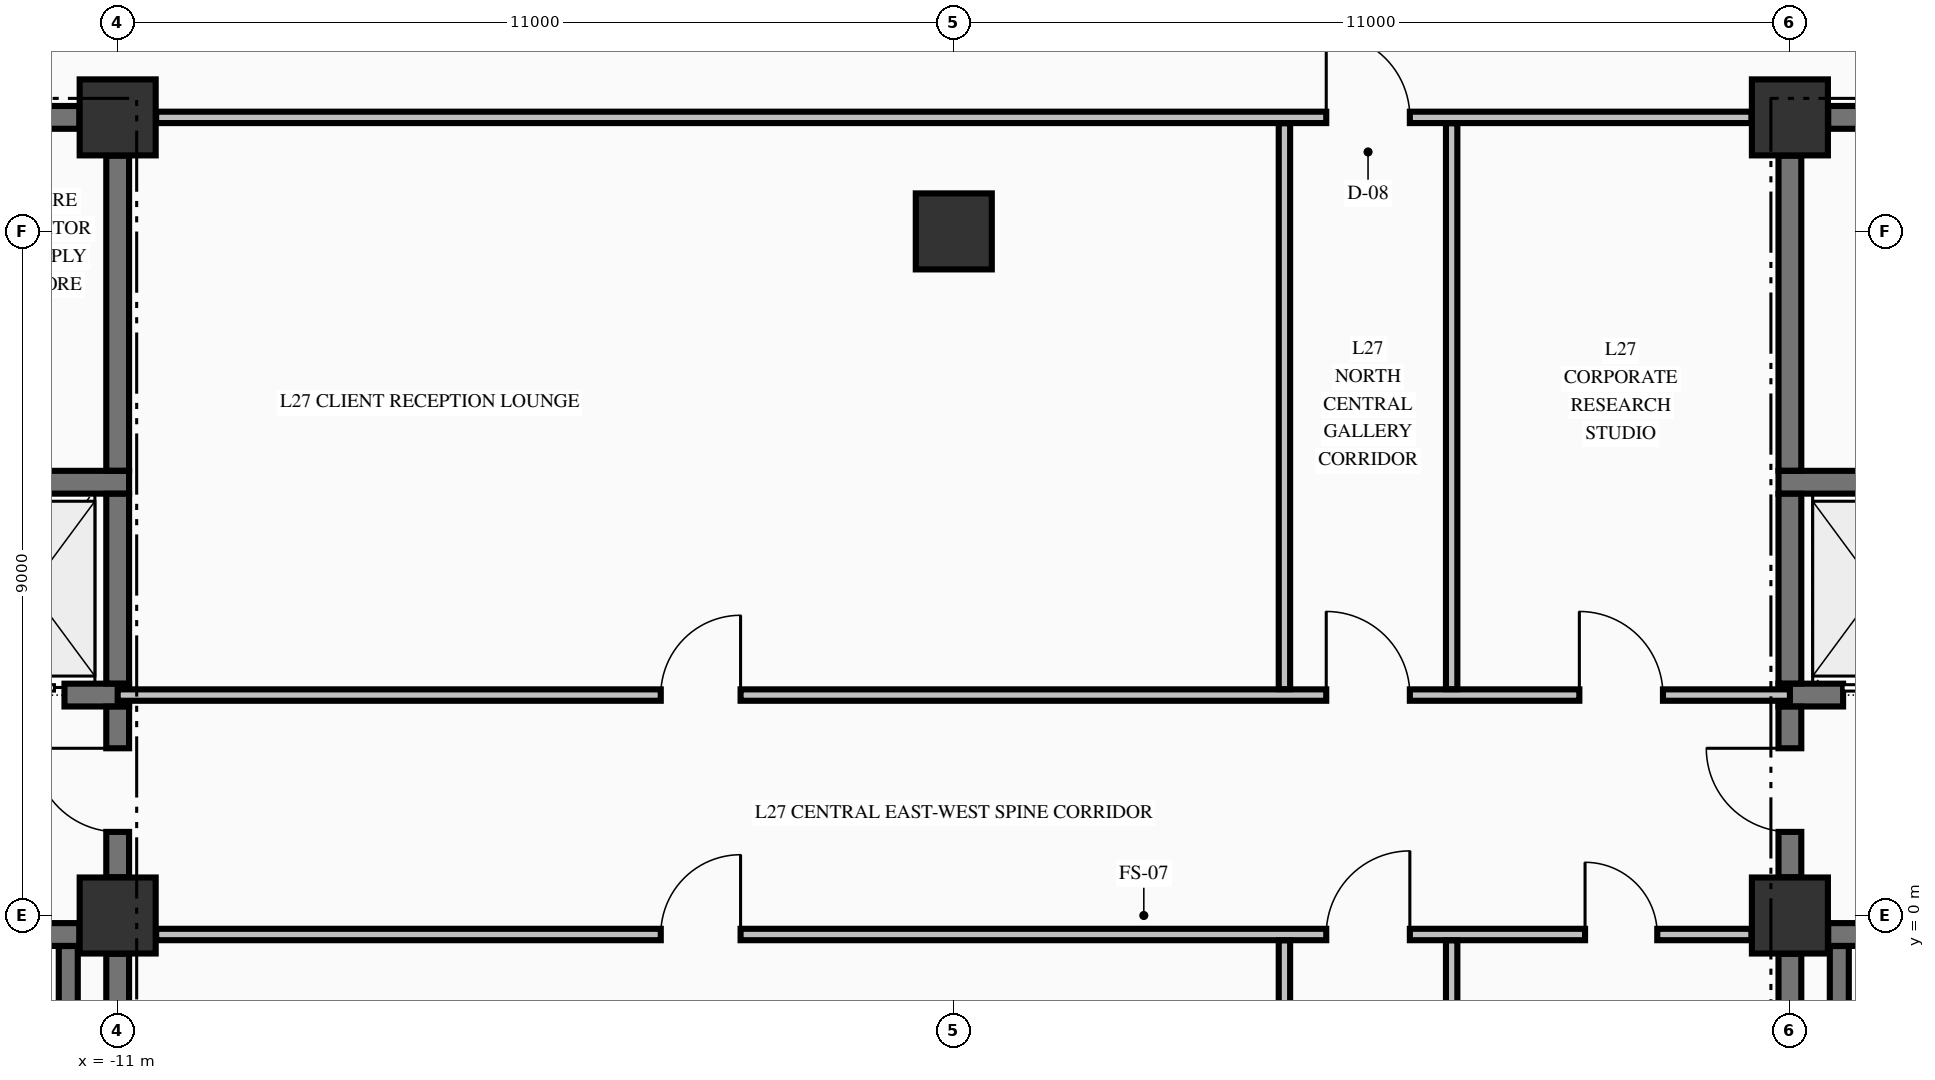
"""IFC4 building model, lengths in metres.
Left out: names, types, materials, properties, quantities, classifications, styles, units other than length and angle.
Written with IfcOpenShell. Run it as: python <this file> out.ifc"""

import sys

from ifc_helpers import new_model, si_unit, direction, frame, frame_2d, origin, origin_2d, place, context, subcontext, project, spatial, rectangle, extrude, element, fill, save


model = new_model("IFC4")
c1 = context("Model", 3, precision=1e-05, world=origin(), true_north=direction((0.0, 1.0)))
c2 = subcontext(c1, "Body", "Model", "MODEL_VIEW")
j1 = project(units=[si_unit("LENGTHUNIT", "METRE"), si_unit("PLANEANGLEUNIT", "RADIAN")], contexts=[c1])
p1 = place(None, origin())
s1 = spatial("IfcSite", under=j1, at=p1, CompositionType="ELEMENT")
p2 = place(p1, origin())
s2 = spatial("IfcBuilding", under=s1, at=p2, CompositionType="ELEMENT")
p3 = place(p2, frame((0.0, 0.0, 109.21)))
s3 = spatial("IfcBuildingStorey", under=s2, at=p3, CompositionType="ELEMENT", Elevation=109.21)
for number, where, z_axis, x_axis in (
    (1, (-11.0, 0.0, -0.25), (0.0, 0.0, 1.0), (1.0, 0.0, 0.0)),
    (2, (-11.0, 10.5, -0.25), (0.0, 0.0, 1.0), (1.0, 0.0, 0.0)),
    (3, (11.0, 0.0, -0.25), (0.0, 0.0, 1.0), (1.0, 0.0, 0.0)),
    (4, (11.0, 10.5, -0.25), (0.0, 0.0, 1.0), (1.0, 0.0, 0.0)),
    (5, (0.0, 9.0, -0.25), (0.0, 0.0, 1.0), (1.0, 0.0, 0.0)),
):
    element("IfcColumn", number, at=place(p3, frame(where, z_axis=z_axis, x_axis=x_axis)), inside=s3, PredefinedType="COLUMN", context=c2, shape_type="SweptSolid", body=[
        extrude(rectangle(XDim=1.0, YDim=1.0, at=origin_2d()), origin(), (0.0, 0.0, 1.0), 3.57),
    ])
p4 = place(p3, frame((-19.496, -0.25, 0.0), z_axis=(0.0, 0.0, 1.0), x_axis=(1.0, 0.0, 0.0)))
e6 = element("IfcWall", 6, at=p4, inside=s3, PredefinedType="SHEAR", context=c2, shape_type="SweptSolid", body=[
    extrude(rectangle(XDim=7.992, YDim=0.3, at=frame_2d((3.996, 0.0))), origin(), (0.0, 0.0, 1.0), 3.32),
])
p5 = place(p4, frame((5.796, 0.0, 0.0)))
e7 = element("IfcOpeningElement", 7, at=p5, cuts=e6, PredefinedType="OPENING", context=c2, shape_type="SweptSolid", body=[
    extrude(rectangle(XDim=1.1, YDim=2.15, at=frame_2d((0.55, 1.075))), frame((0.0, 0.16, 0.0), z_axis=(0.0, -1.0, 0.0), x_axis=(1.0, 0.0, 0.0)), (0.0, 0.0, 1.0), 0.32),
])
p6 = place(p3, frame((11.504, -0.25, 0.0), z_axis=(0.0, 0.0, 1.0), x_axis=(1.0, 0.0, 0.0)))
e8 = element("IfcWall", 8, at=p6, inside=s3, PredefinedType="SHEAR", context=c2, shape_type="SweptSolid", body=[
    extrude(rectangle(XDim=3.371, YDim=0.3, at=frame_2d((1.686, 0.0))), origin(), (0.0, 0.0, 1.0), 3.32),
])
p7 = place(p6, frame((1.096, 0.0, 0.0)))
e9 = element("IfcOpeningElement", 9, at=p7, cuts=e8, PredefinedType="OPENING", context=c2, shape_type="SweptSolid", body=[
    extrude(rectangle(XDim=1.1, YDim=2.15, at=frame_2d((0.55, 1.075))), frame((0.0, 0.16, 0.0), z_axis=(0.0, -1.0, 0.0), x_axis=(1.0, 0.0, 0.0)), (0.0, 0.0, 1.0), 0.32),
])
p8 = place(p3, frame((-14.875, 2.9, 0.0), z_axis=(0.0, 0.0, 1.0), x_axis=(1.0, 0.0, 0.0)))
e10 = element("IfcWall", 10, at=p8, inside=s3, PredefinedType="SHEAR", context=c2, shape_type="SweptSolid", body=[
    extrude(rectangle(XDim=4.025, YDim=0.3, at=frame_2d((2.012, 0.0))), origin(), (0.0, 0.0, 1.0), 3.32),
])
p9 = place(p8, frame((2.075, 0.0, 0.0)))
e11 = element("IfcOpeningElement", 11, at=p9, cuts=e10, PredefinedType="OPENING", context=c2, shape_type="SweptSolid", body=[
    extrude(rectangle(XDim=1.1, YDim=2.2, at=frame_2d((0.55, 1.1))), frame((0.0, 0.16, 0.0), z_axis=(0.0, -1.0, 0.0), x_axis=(1.0, 0.0, 0.0)), (0.0, 0.0, 1.0), 0.32),
])
p10 = place(p3, frame((10.85, 2.9, 0.0), z_axis=(0.0, 0.0, 1.0), x_axis=(1.0, 0.0, 0.0)))
e12 = element("IfcWall", 12, at=p10, inside=s3, PredefinedType="SHEAR", context=c2, shape_type="SweptSolid", body=[
    extrude(rectangle(XDim=4.025, YDim=0.3, at=frame_2d((2.012, 0.0))), origin(), (0.0, 0.0, 1.0), 3.32),
])
p11 = place(p10, frame((0.85, 0.0, 0.0)))
e13 = element("IfcOpeningElement", 13, at=p11, cuts=e12, PredefinedType="OPENING", context=c2, shape_type="SweptSolid", body=[
    extrude(rectangle(XDim=1.1, YDim=2.2, at=frame_2d((0.55, 1.1))), frame((0.0, 0.16, 0.0), z_axis=(0.0, -1.0, 0.0), x_axis=(1.0, 0.0, 0.0)), (0.0, 0.0, 1.0), 0.32),
])
for number, where, z_axis, x_axis in (
    (14, (-14.875, 5.7, 0.0), (0.0, 0.0, 1.0), (1.0, 0.0, 0.0)),
    (15, (10.85, 5.7, 0.0), (0.0, 0.0, 1.0), (1.0, 0.0, 0.0)),
):
    element("IfcWall", number, at=place(p3, frame(where, z_axis=z_axis, x_axis=x_axis)), inside=s3, PredefinedType="SHEAR", context=c2, shape_type="SweptSolid", body=[
        extrude(rectangle(XDim=4.025, YDim=0.3, at=frame_2d((2.012, 0.0))), origin(), (0.0, 0.0, 1.0), 3.32),
    ])
p12 = place(p3, frame((-14.7, 10.5, 0.0), z_axis=(0.0, 0.0, 1.0), x_axis=(1.0, 0.0, 0.0)))
e16 = element("IfcWall", 16, at=p12, inside=s3, PredefinedType="SHEAR", context=c2, shape_type="SweptSolid", body=[
    extrude(rectangle(XDim=3.196, YDim=0.3, at=frame_2d((1.598, 0.0))), origin(), (0.0, 0.0, 1.0), 3.32),
])
p13 = place(p12, frame((0.245, 0.0, 0.0)))
e17 = element("IfcOpeningElement", 17, at=p13, cuts=e16, PredefinedType="OPENING", context=c2, shape_type="SweptSolid", body=[
    extrude(rectangle(XDim=0.95, YDim=2.15, at=frame_2d((0.475, 1.075))), frame((0.0, 0.16, 0.0), z_axis=(0.0, -1.0, 0.0), x_axis=(1.0, 0.0, 0.0)), (0.0, 0.0, 1.0), 0.32),
])
p14 = place(p3, frame((11.504, 10.5, 0.0), z_axis=(0.0, 0.0, 1.0), x_axis=(1.0, 0.0, 0.0)))
e18 = element("IfcWall", 18, at=p14, inside=s3, PredefinedType="SHEAR", context=c2, shape_type="SweptSolid", body=[
    extrude(rectangle(XDim=3.196, YDim=0.3, at=frame_2d((1.598, 0.0))), origin(), (0.0, 0.0, 1.0), 3.32),
])
p15 = place(p14, frame((1.471, 0.0, 0.0)))
e19 = element("IfcOpeningElement", 19, at=p15, cuts=e18, PredefinedType="OPENING", context=c2, shape_type="SweptSolid", body=[
    extrude(rectangle(XDim=0.95, YDim=2.15, at=frame_2d((0.475, 1.075))), frame((0.0, 0.16, 0.0), z_axis=(0.0, -1.0, 0.0), x_axis=(1.0, 0.0, 0.0)), (0.0, 0.0, 1.0), 0.32),
])
p16 = place(p3, frame((-10.494, -0.25, 0.0), z_axis=(0.0, 0.0, 1.0), x_axis=(1.0, 0.0, 0.0)))
e20 = element("IfcWall", 20, at=p16, inside=s3, PredefinedType="PARTITIONING", context=c2, shape_type="SweptSolid", body=[
    extrude(rectangle(XDim=20.988, YDim=0.15, at=frame_2d((10.494, 0.0))), origin(), (0.0, 0.0, 1.0), 3.32),
])
p17 = place(p16, frame((15.394, 0.0, 0.0)))
e21 = element("IfcOpeningElement", 21, at=p17, cuts=e20, PredefinedType="OPENING", context=c2, shape_type="SweptSolid", body=[
    extrude(rectangle(XDim=1.1, YDim=2.15, at=frame_2d((0.55, 1.075))), frame((0.0, 0.085, 0.0), z_axis=(0.0, -1.0, 0.0), x_axis=(1.0, 0.0, 0.0)), (0.0, 0.0, 1.0), 0.17),
])
p18 = place(p16, frame((6.639, 0.0, 0.0)))
e22 = element("IfcOpeningElement", 22, at=p18, cuts=e20, PredefinedType="OPENING", context=c2, shape_type="SweptSolid", body=[
    extrude(rectangle(XDim=1.05, YDim=2.15, at=frame_2d((0.525, 1.075))), frame((0.0, 0.085, 0.0), z_axis=(0.0, -1.0, 0.0), x_axis=(1.0, 0.0, 0.0)), (0.0, 0.0, 1.0), 0.17),
])
p19 = place(p16, frame((18.799, 0.0, 0.0)))
e23 = element("IfcOpeningElement", 23, at=p19, cuts=e20, PredefinedType="OPENING", context=c2, shape_type="SweptSolid", body=[
    extrude(rectangle(XDim=0.95, YDim=2.15, at=frame_2d((0.475, 1.075))), frame((0.0, 0.085, 0.0), z_axis=(0.0, -1.0, 0.0), x_axis=(1.0, 0.0, 0.0)), (0.0, 0.0, 1.0), 0.17),
])
p20 = place(p3, frame((-11.0, 2.9, 0.0), z_axis=(0.0, 0.0, 1.0), x_axis=(1.0, 0.0, 0.0)))
e24 = element("IfcWall", 24, at=p20, inside=s3, PredefinedType="PARTITIONING", context=c2, shape_type="SweptSolid", body=[
    extrude(rectangle(XDim=22.0, YDim=0.15, at=frame_2d((11.0, 0.0))), origin(), (0.0, 0.0, 1.0), 3.32),
])
p21 = place(p20, frame((15.9, 0.0, 0.0)))
e25 = element("IfcOpeningElement", 25, at=p21, cuts=e24, PredefinedType="OPENING", context=c2, shape_type="SweptSolid", body=[
    extrude(rectangle(XDim=1.1, YDim=2.15, at=frame_2d((0.55, 1.075))), frame((0.0, 0.085, 0.0), z_axis=(0.0, -1.0, 0.0), x_axis=(1.0, 0.0, 0.0)), (0.0, 0.0, 1.0), 0.17),
])
p22 = place(p20, frame((7.145, 0.0, 0.0)))
e26 = element("IfcOpeningElement", 26, at=p22, cuts=e24, PredefinedType="OPENING", context=c2, shape_type="SweptSolid", body=[
    extrude(rectangle(XDim=1.05, YDim=2.15, at=frame_2d((0.525, 1.075))), frame((0.0, 0.085, 0.0), z_axis=(0.0, -1.0, 0.0), x_axis=(1.0, 0.0, 0.0)), (0.0, 0.0, 1.0), 0.17),
])
p23 = place(p20, frame((19.23, 0.0, 0.0)))
e27 = element("IfcOpeningElement", 27, at=p23, cuts=e24, PredefinedType="OPENING", context=c2, shape_type="SweptSolid", body=[
    extrude(rectangle(XDim=1.1, YDim=2.15, at=frame_2d((0.55, 1.075))), frame((0.0, 0.085, 0.0), z_axis=(0.0, -1.0, 0.0), x_axis=(1.0, 0.0, 0.0)), (0.0, 0.0, 1.0), 0.17),
])
p24 = place(p3, frame((-10.494, 10.5, 0.0), z_axis=(0.0, 0.0, 1.0), x_axis=(1.0, 0.0, 0.0)))
e28 = element("IfcWall", 28, at=p24, inside=s3, PredefinedType="PARTITIONING", context=c2, shape_type="SweptSolid", body=[
    extrude(rectangle(XDim=20.988, YDim=0.15, at=frame_2d((10.494, 0.0))), origin(), (0.0, 0.0, 1.0), 3.32),
])
p25 = place(p24, frame((15.394, 0.0, 0.0)))
e29 = element("IfcOpeningElement", 29, at=p25, cuts=e28, PredefinedType="OPENING", context=c2, shape_type="SweptSolid", body=[
    extrude(rectangle(XDim=1.1, YDim=2.15, at=frame_2d((0.55, 1.075))), frame((0.0, 0.085, 0.0), z_axis=(0.0, -1.0, 0.0), x_axis=(1.0, 0.0, 0.0)), (0.0, 0.0, 1.0), 0.17),
])
p26 = place(p3, frame((-11.65, -9.798, 0.0), z_axis=(0.0, 0.0, 1.0), x_axis=(0.0, 1.0, 0.0)))
e30 = element("IfcWall", 30, at=p26, inside=s3, PredefinedType="SOLIDWALL", context=c2, shape_type="SweptSolid", body=[
    extrude(rectangle(XDim=9.396, YDim=0.25, at=frame_2d((4.698, 0.0))), origin(), (0.0, 0.0, 1.0), 3.32),
])
p27 = place(p3, frame((-11.0, -9.446, 0.0), z_axis=(0.0, 0.0, 1.0), x_axis=(0.0, 1.0, 0.0)))
e31 = element("IfcWall", 31, at=p27, inside=s3, PredefinedType="SHEAR", context=c2, shape_type="SweptSolid", body=[
    extrude(rectangle(XDim=8.942, YDim=0.3, at=frame_2d((4.471, 0.0))), origin(), (0.0, 0.0, 1.0), 3.32),
])
p28 = place(p3, frame((-11.0, 0.504, 0.0), z_axis=(0.0, 0.0, 1.0), x_axis=(0.0, 1.0, 0.0)))
e32 = element("IfcWall", 32, at=p28, inside=s3, PredefinedType="SHEAR", context=c2, shape_type="SweptSolid", body=[
    extrude(rectangle(XDim=2.244, YDim=0.3, at=frame_2d((1.122, 0.0))), origin(), (0.0, 0.0, 1.0), 3.32),
])
p29 = place(p28, frame((0.596, 0.0, 0.0)))
e33 = element("IfcOpeningElement", 33, at=p29, cuts=e32, PredefinedType="OPENING", context=c2, shape_type="SweptSolid", body=[
    extrude(rectangle(XDim=1.1, YDim=2.15, at=frame_2d((0.55, 1.075))), frame((0.0, 0.16, 0.0), z_axis=(0.0, -1.0, 0.0), x_axis=(1.0, 0.0, 0.0)), (0.0, 0.0, 1.0), 0.32),
])
p30 = place(p3, frame((-11.0, 3.052, 0.0), z_axis=(0.0, 0.0, 1.0), x_axis=(0.0, 1.0, 0.0)))
e34 = element("IfcWall", 34, at=p30, inside=s3, PredefinedType="SHEAR", context=c2, shape_type="SweptSolid", body=[
    extrude(rectangle(XDim=2.496, YDim=0.3, at=frame_2d((1.248, 0.0))), origin(), (0.0, 0.0, 1.0), 3.32),
])
p31 = place(p3, frame((-11.0, 5.852, 0.0), z_axis=(0.0, 0.0, 1.0), x_axis=(0.0, 1.0, 0.0)))
e35 = element("IfcWall", 35, at=p31, inside=s3, PredefinedType="SHEAR", context=c2, shape_type="SweptSolid", body=[
    extrude(rectangle(XDim=4.144, YDim=0.3, at=frame_2d((2.072, 0.0))), origin(), (0.0, 0.0, 1.0), 3.32),
])
p32 = place(p3, frame((11.0, -9.446, 0.0), z_axis=(0.0, 0.0, 1.0), x_axis=(0.0, 1.0, 0.0)))
e36 = element("IfcWall", 36, at=p32, inside=s3, PredefinedType="SHEAR", context=c2, shape_type="SweptSolid", body=[
    extrude(rectangle(XDim=8.942, YDim=0.3, at=frame_2d((4.471, 0.0))), origin(), (0.0, 0.0, 1.0), 3.32),
])
p33 = place(p3, frame((11.0, 0.504, 0.0), z_axis=(0.0, 0.0, 1.0), x_axis=(0.0, 1.0, 0.0)))
e37 = element("IfcWall", 37, at=p33, inside=s3, PredefinedType="SHEAR", context=c2, shape_type="SweptSolid", body=[
    extrude(rectangle(XDim=2.244, YDim=0.3, at=frame_2d((1.122, 0.0))), origin(), (0.0, 0.0, 1.0), 3.32),
])
p34 = place(p33, frame((0.596, 0.0, 0.0)))
e38 = element("IfcOpeningElement", 38, at=p34, cuts=e37, PredefinedType="OPENING", context=c2, shape_type="SweptSolid", body=[
    extrude(rectangle(XDim=1.1, YDim=2.15, at=frame_2d((0.55, 1.075))), frame((0.0, 0.16, 0.0), z_axis=(0.0, -1.0, 0.0), x_axis=(1.0, 0.0, 0.0)), (0.0, 0.0, 1.0), 0.32),
])
p35 = place(p3, frame((11.0, 3.052, 0.0), z_axis=(0.0, 0.0, 1.0), x_axis=(0.0, 1.0, 0.0)))
e39 = element("IfcWall", 39, at=p35, inside=s3, PredefinedType="SHEAR", context=c2, shape_type="SweptSolid", body=[
    extrude(rectangle(XDim=2.496, YDim=0.3, at=frame_2d((1.248, 0.0))), origin(), (0.0, 0.0, 1.0), 3.32),
])
p36 = place(p3, frame((11.0, 5.852, 0.0), z_axis=(0.0, 0.0, 1.0), x_axis=(0.0, 1.0, 0.0)))
e40 = element("IfcWall", 40, at=p36, inside=s3, PredefinedType="SHEAR", context=c2, shape_type="SweptSolid", body=[
    extrude(rectangle(XDim=4.144, YDim=0.3, at=frame_2d((2.072, 0.0))), origin(), (0.0, 0.0, 1.0), 3.32),
])
p37 = place(p3, frame((11.65, -9.798, 0.0), z_axis=(0.0, 0.0, 1.0), x_axis=(0.0, 1.0, 0.0)))
e41 = element("IfcWall", 41, at=p37, inside=s3, PredefinedType="SOLIDWALL", context=c2, shape_type="SweptSolid", body=[
    extrude(rectangle(XDim=9.396, YDim=0.25, at=frame_2d((4.698, 0.0))), origin(), (0.0, 0.0, 1.0), 3.32),
])
p38 = place(p3, frame((4.35, -9.872, 0.0), z_axis=(0.0, 0.0, 1.0), x_axis=(0.0, 1.0, 0.0)))
e42 = element("IfcWall", 42, at=p38, inside=s3, PredefinedType="PARTITIONING", context=c2, shape_type="SweptSolid", body=[
    extrude(rectangle(XDim=9.544, YDim=0.15, at=frame_2d((4.772, 0.0))), origin(), (0.0, 0.0, 1.0), 3.32),
])
p39 = place(p3, frame((4.35, 2.978, 0.0), z_axis=(0.0, 0.0, 1.0), x_axis=(0.0, 1.0, 0.0)))
e43 = element("IfcWall", 43, at=p39, inside=s3, PredefinedType="PARTITIONING", context=c2, shape_type="SweptSolid", body=[
    extrude(rectangle(XDim=7.444, YDim=0.15, at=frame_2d((3.722, 0.0))), origin(), (0.0, 0.0, 1.0), 3.32),
])
p40 = place(p3, frame((6.55, -5.247, 0.0), z_axis=(0.0, 0.0, 1.0), x_axis=(0.0, 1.0, 0.0)))
e44 = element("IfcWall", 44, at=p40, inside=s3, PredefinedType="PARTITIONING", context=c2, shape_type="SweptSolid", body=[
    extrude(rectangle(XDim=4.919, YDim=0.15, at=frame_2d((2.459, 0.0))), origin(), (0.0, 0.0, 1.0), 3.32),
])
p41 = place(p3, frame((6.55, 2.978, 0.0), z_axis=(0.0, 0.0, 1.0), x_axis=(0.0, 1.0, 0.0)))
e45 = element("IfcWall", 45, at=p41, inside=s3, PredefinedType="PARTITIONING", context=c2, shape_type="SweptSolid", body=[
    extrude(rectangle(XDim=7.444, YDim=0.15, at=frame_2d((3.722, 0.0))), origin(), (0.0, 0.0, 1.0), 3.32),
])
p42 = place(p29, origin())
e46 = element("IfcDoor", 46, at=p42, inside=s3, OperationType="SINGLE_SWING_RIGHT", PredefinedType="DOOR", context=c2, shape_type="SweptSolid", body=[
    extrude(rectangle(XDim=1.1, YDim=2.15, at=frame_2d((0.55, 1.075))), frame((0.0, 0.025, 0.0), z_axis=(0.0, -1.0, 0.0), x_axis=(1.0, 0.0, 0.0)), (0.0, 0.0, 1.0), 0.05),
])
fill(e33, e46)
p43 = place(p9, origin())
e47 = element("IfcDoor", 47, at=p43, inside=s3, OperationType="SLIDING_TO_LEFT", PredefinedType="DOOR", context=c2, shape_type="SweptSolid", body=[
    extrude(rectangle(XDim=1.1, YDim=2.2, at=frame_2d((0.55, 1.1))), frame((0.0, 0.025, 0.0), z_axis=(0.0, -1.0, 0.0), x_axis=(1.0, 0.0, 0.0)), (0.0, 0.0, 1.0), 0.05),
])
fill(e11, e47)
p44 = place(p34, origin())
e48 = element("IfcDoor", 48, at=p44, inside=s3, OperationType="SINGLE_SWING_RIGHT", PredefinedType="DOOR", context=c2, shape_type="SweptSolid", body=[
    extrude(rectangle(XDim=1.1, YDim=2.15, at=frame_2d((0.55, 1.075))), frame((0.0, 0.025, 0.0), z_axis=(0.0, -1.0, 0.0), x_axis=(1.0, 0.0, 0.0)), (0.0, 0.0, 1.0), 0.05),
])
fill(e38, e48)
p45 = place(p11, origin())
e49 = element("IfcDoor", 49, at=p45, inside=s3, OperationType="SLIDING_TO_RIGHT", PredefinedType="DOOR", context=c2, shape_type="SweptSolid", body=[
    extrude(rectangle(XDim=1.1, YDim=2.2, at=frame_2d((0.55, 1.1))), frame((0.0, 0.025, 0.0), z_axis=(0.0, -1.0, 0.0), x_axis=(1.0, 0.0, 0.0)), (0.0, 0.0, 1.0), 0.05),
])
fill(e13, e49)
p46 = place(p25, origin())
e50 = element("IfcDoor", 50, at=p46, inside=s3, OperationType="SINGLE_SWING_LEFT", PredefinedType="DOOR", context=c2, shape_type="SweptSolid", body=[
    extrude(rectangle(XDim=1.1, YDim=2.15, at=frame_2d((0.55, 1.075))), frame((0.0, 0.025, 0.0), z_axis=(0.0, -1.0, 0.0), x_axis=(1.0, 0.0, 0.0)), (0.0, 0.0, 1.0), 0.05),
])
fill(e29, e50)
p47 = place(p21, origin())
e51 = element("IfcDoor", 51, at=p47, inside=s3, OperationType="SINGLE_SWING_LEFT", PredefinedType="DOOR", context=c2, shape_type="SweptSolid", body=[
    extrude(rectangle(XDim=1.1, YDim=2.15, at=frame_2d((0.55, 1.075))), frame((0.0, 0.025, 0.0), z_axis=(0.0, -1.0, 0.0), x_axis=(1.0, 0.0, 0.0)), (0.0, 0.0, 1.0), 0.05),
])
fill(e25, e51)
p48 = place(p17, origin())
e52 = element("IfcDoor", 52, at=p48, inside=s3, OperationType="SINGLE_SWING_RIGHT", PredefinedType="DOOR", context=c2, shape_type="SweptSolid", body=[
    extrude(rectangle(XDim=1.1, YDim=2.15, at=frame_2d((0.55, 1.075))), frame((0.0, 0.025, 0.0), z_axis=(0.0, -1.0, 0.0), x_axis=(1.0, 0.0, 0.0)), (0.0, 0.0, 1.0), 0.05),
])
fill(e21, e52)
p49 = place(p22, origin())
e53 = element("IfcDoor", 53, at=p49, inside=s3, OperationType="SINGLE_SWING_RIGHT", PredefinedType="DOOR", context=c2, shape_type="SweptSolid", body=[
    extrude(rectangle(XDim=1.05, YDim=2.15, at=frame_2d((0.525, 1.075))), frame((0.0, 0.025, 0.0), z_axis=(0.0, -1.0, 0.0), x_axis=(1.0, 0.0, 0.0)), (0.0, 0.0, 1.0), 0.05),
])
fill(e26, e53)
p50 = place(p23, origin())
e54 = element("IfcDoor", 54, at=p50, inside=s3, OperationType="SINGLE_SWING_LEFT", PredefinedType="DOOR", context=c2, shape_type="SweptSolid", body=[
    extrude(rectangle(XDim=1.1, YDim=2.15, at=frame_2d((0.55, 1.075))), frame((0.0, 0.025, 0.0), z_axis=(0.0, -1.0, 0.0), x_axis=(1.0, 0.0, 0.0)), (0.0, 0.0, 1.0), 0.05),
])
fill(e27, e54)
p51 = place(p18, origin())
e55 = element("IfcDoor", 55, at=p51, inside=s3, OperationType="SINGLE_SWING_RIGHT", PredefinedType="DOOR", context=c2, shape_type="SweptSolid", body=[
    extrude(rectangle(XDim=1.05, YDim=2.15, at=frame_2d((0.525, 1.075))), frame((0.0, 0.025, 0.0), z_axis=(0.0, -1.0, 0.0), x_axis=(1.0, 0.0, 0.0)), (0.0, 0.0, 1.0), 0.05),
])
fill(e22, e55)
p52 = place(p19, origin())
e56 = element("IfcDoor", 56, at=p52, inside=s3, OperationType="SINGLE_SWING_LEFT", PredefinedType="DOOR", context=c2, shape_type="SweptSolid", body=[
    extrude(rectangle(XDim=0.95, YDim=2.15, at=frame_2d((0.475, 1.075))), frame((0.0, 0.025, 0.0), z_axis=(0.0, -1.0, 0.0), x_axis=(1.0, 0.0, 0.0)), (0.0, 0.0, 1.0), 0.05),
])
fill(e23, e56)
save(model, sys.argv[1])
